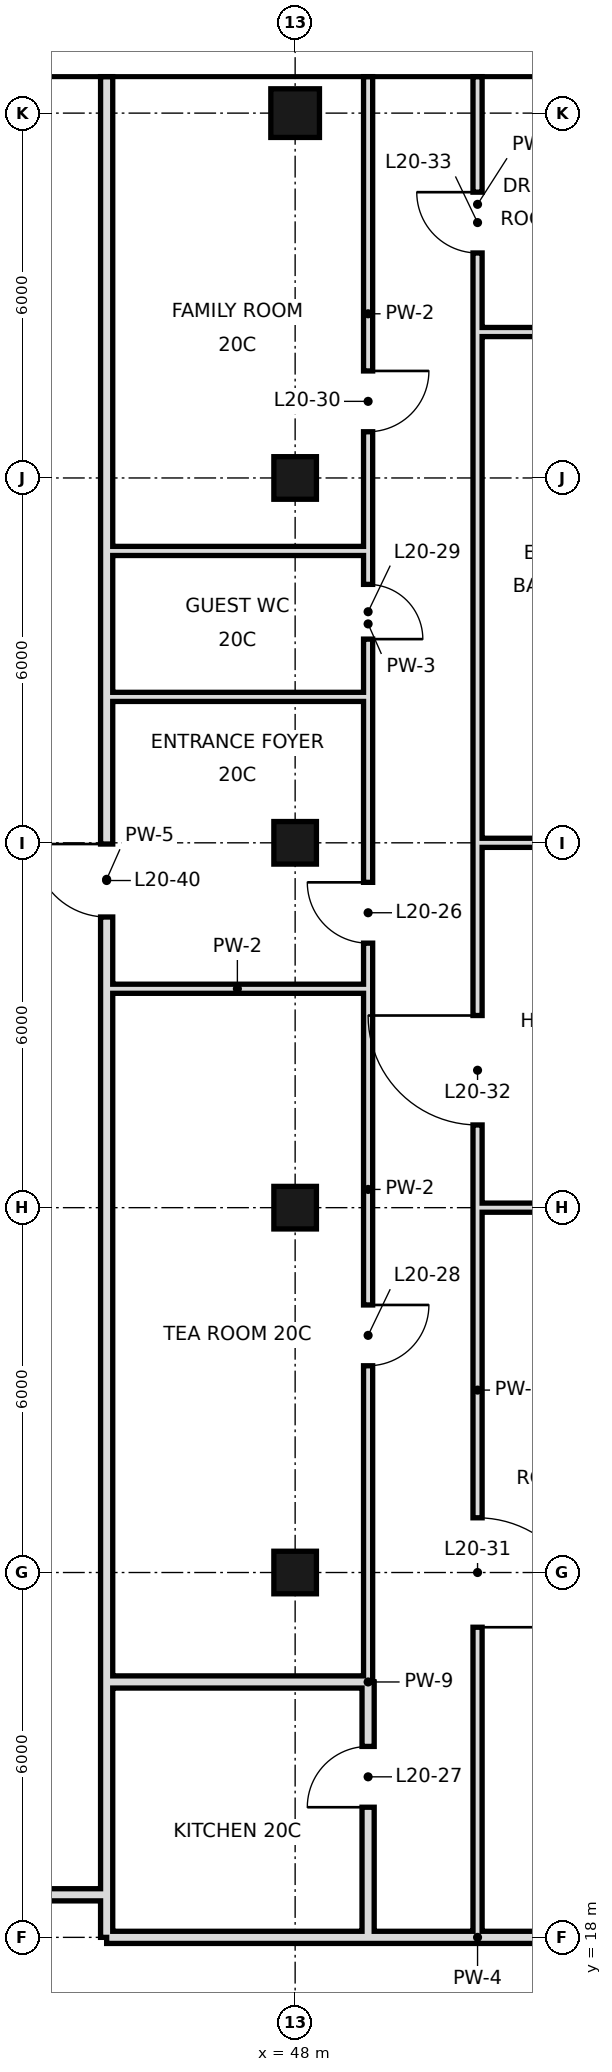
"""IFC4 building model, lengths in metres.
Left out: names, types, materials, properties, quantities, classifications, styles, units other than length and angle.
Written with IfcOpenShell. Run it as: python <this file> out.ifc"""

import sys

from ifc_helpers import new_model, si_unit, direction, frame, frame_2d, origin, origin_2d, place, context, subcontext, project, spatial, rectangle, hollow_rectangle, extrude, element, fill, save


model = new_model("IFC4")
c1 = context("Model", 3, precision=1e-05, world=origin(), true_north=direction((0.0, 1.0)))
c2 = subcontext(c1, "Body", "Model", "MODEL_VIEW")
j1 = project(units=[si_unit("LENGTHUNIT", "METRE"), si_unit("PLANEANGLEUNIT", "RADIAN")], contexts=[c1])
p1 = place(None, origin())
s1 = spatial("IfcSite", under=j1, at=p1, CompositionType="ELEMENT")
p2 = place(p1, origin())
s2 = spatial("IfcBuilding", under=s1, at=p2, CompositionType="ELEMENT")
p3 = place(p2, frame((0.0, 0.0, 96.2)))
s3 = spatial("IfcBuildingStorey", under=s2, at=p3, CompositionType="ELEMENT", Elevation=96.2)
for number, where, z_axis, x_axis in (
    (1, (48.0, 24.0, 0.0), (0.0, 0.0, 1.0), (1.0, 0.0, 0.0)),
    (2, (48.0, 30.0, 0.0), (0.0, 0.0, 1.0), (1.0, 0.0, 0.0)),
    (3, (48.0, 36.0, 0.0), (0.0, 0.0, 1.0), (1.0, 0.0, 0.0)),
    (4, (48.0, 42.0, 0.0), (0.0, 0.0, 1.0), (1.0, 0.0, 0.0)),
):
    element("IfcColumn", number, at=place(p3, frame(where, z_axis=z_axis, x_axis=x_axis)), inside=s3, PredefinedType="COLUMN", context=c2, shape_type="SweptSolid", body=[
        extrude(hollow_rectangle(XDim=0.7, YDim=0.7, WallThickness=0.036, at=origin_2d()), origin(), (0.0, 0.0, 1.0), 3.6),
    ])
p4 = place(p3, frame((48.0, 48.0, 0.0), z_axis=(0.0, 0.0, 1.0), x_axis=(1.0, 0.0, 0.0)))
e5 = element("IfcColumn", 5, at=p4, inside=s3, PredefinedType="COLUMN", context=c2, shape_type="SweptSolid", body=[
    extrude(hollow_rectangle(XDim=0.8, YDim=0.8, WallThickness=0.04, at=origin_2d()), origin(), (0.0, 0.0, 1.0), 3.6),
])
p5 = place(p3, frame((44.9, 22.2, 0.0), z_axis=(0.0, 0.0, 1.0), x_axis=(0.0, 1.0, 0.0)))
e6 = element("IfcWall", 6, at=p5, inside=s3, PredefinedType="SOLIDWALL", context=c2, shape_type="SweptSolid", body=[
    extrude(rectangle(XDim=26.4, YDim=0.2, at=frame_2d((13.2, 0.0))), origin(), (0.0, 0.0, 1.0), 2.72),
])
p6 = place(p5, frame((12.58, 0.0, 0.0)))
e7 = element("IfcOpeningElement", 7, at=p6, cuts=e6, PredefinedType="OPENING", context=c2, shape_type="SweptSolid", body=[
    extrude(rectangle(XDim=1.2, YDim=2.4, at=frame_2d((0.6, 1.2))), frame((0.0, 0.11, 0.0), z_axis=(0.0, -1.0, 0.0), x_axis=(1.0, 0.0, 0.0)), (0.0, 0.0, 1.0), 0.22),
])
p7 = place(p3, frame((44.9, 18.0, 0.0), z_axis=(0.0, 0.0, 1.0), x_axis=(0.0, 1.0, 0.0)))
e8 = element("IfcWall", 8, at=p7, inside=s3, PredefinedType="SOLIDWALL", context=c2, shape_type="SweptSolid", body=[
    extrude(rectangle(XDim=4.2, YDim=0.2, at=frame_2d((2.1, 0.0))), origin(), (0.0, 0.0, 1.0), 2.97),
])
p8 = place(p3, frame((49.2, 18.0, 0.0), z_axis=(0.0, 0.0, 1.0), x_axis=(0.0, 1.0, 0.0)))
e9 = element("IfcWall", 9, at=p8, inside=s3, PredefinedType="SOLIDWALL", context=c2, shape_type="SweptSolid", body=[
    extrude(rectangle(XDim=4.2, YDim=0.2, at=frame_2d((2.1, 0.0))), origin(), (0.0, 0.0, 1.0), 2.72),
])
p9 = place(p8, frame((2.14, 0.0, 0.0)))
e10 = element("IfcOpeningElement", 10, at=p9, cuts=e9, PredefinedType="OPENING", context=c2, shape_type="SweptSolid", body=[
    extrude(rectangle(XDim=1.0, YDim=2.4, at=frame_2d((0.5, 1.2))), frame((0.0, 0.11, 0.0), z_axis=(0.0, -1.0, 0.0), x_axis=(1.0, 0.0, 0.0)), (0.0, 0.0, 1.0), 0.22),
])
p10 = place(p3, frame((49.2, 22.2, 0.0), z_axis=(0.0, 0.0, 1.0), x_axis=(0.0, 1.0, 0.0)))
e11 = element("IfcWall", 11, at=p10, inside=s3, PredefinedType="PARTITIONING", context=c2, shape_type="SweptSolid", body=[
    extrude(rectangle(XDim=16.2, YDim=0.15, at=frame_2d((8.1, 0.0))), origin(), (0.0, 0.0, 1.0), 3.42),
])
p11 = place(p10, frame((12.15, 0.0, 0.0)))
e12 = element("IfcOpeningElement", 12, at=p11, cuts=e11, PredefinedType="OPENING", context=c2, shape_type="SweptSolid", body=[
    extrude(rectangle(XDim=1.0, YDim=2.4, at=frame_2d((0.5, 1.2))), frame((0.0, 0.085, 0.0), z_axis=(0.0, -1.0, 0.0), x_axis=(1.0, 0.0, 0.0)), (0.0, 0.0, 1.0), 0.17),
])
p12 = place(p10, frame((5.2, 0.0, 0.0)))
e13 = element("IfcOpeningElement", 13, at=p12, cuts=e11, PredefinedType="OPENING", context=c2, shape_type="SweptSolid", body=[
    extrude(rectangle(XDim=1.0, YDim=2.4, at=frame_2d((0.5, 1.2))), frame((0.0, 0.085, 0.0), z_axis=(0.0, -1.0, 0.0), x_axis=(1.0, 0.0, 0.0)), (0.0, 0.0, 1.0), 0.17),
])
p13 = place(p3, frame((49.2, 40.8, 0.0), z_axis=(0.0, 0.0, 1.0), x_axis=(0.0, 1.0, 0.0)))
e14 = element("IfcWall", 14, at=p13, inside=s3, PredefinedType="PARTITIONING", context=c2, shape_type="SweptSolid", body=[
    extrude(rectangle(XDim=7.8, YDim=0.15, at=frame_2d((3.9, 0.0))), origin(), (0.0, 0.0, 1.0), 3.42),
])
p14 = place(p13, frame((1.96, 0.0, 0.0)))
e15 = element("IfcOpeningElement", 15, at=p14, cuts=e14, PredefinedType="OPENING", context=c2, shape_type="SweptSolid", body=[
    extrude(rectangle(XDim=1.0, YDim=2.4, at=frame_2d((0.5, 1.2))), frame((0.0, 0.085, 0.0), z_axis=(0.0, -1.0, 0.0), x_axis=(1.0, 0.0, 0.0)), (0.0, 0.0, 1.0), 0.17),
])
p15 = place(p3, frame((49.2, 38.4, 0.0), z_axis=(0.0, 0.0, 1.0), x_axis=(0.0, 1.0, 0.0)))
e16 = element("IfcWall", 16, at=p15, inside=s3, PredefinedType="PARTITIONING", context=c2, shape_type="SweptSolid", body=[
    extrude(rectangle(XDim=2.4, YDim=0.15, at=frame_2d((1.2, 0.0))), origin(), (0.0, 0.0, 1.0), 3.42),
])
p16 = place(p15, frame((0.95, 0.0, 0.0)))
e17 = element("IfcOpeningElement", 17, at=p16, cuts=e16, PredefinedType="OPENING", context=c2, shape_type="SweptSolid", body=[
    extrude(rectangle(XDim=0.9, YDim=2.4, at=frame_2d((0.45, 1.2))), frame((0.0, 0.085, 0.0), z_axis=(0.0, -1.0, 0.0), x_axis=(1.0, 0.0, 0.0)), (0.0, 0.0, 1.0), 0.17),
])
p17 = place(p3, frame((51.0, 18.0, 0.0), z_axis=(0.0, 0.0, 1.0), x_axis=(0.0, 1.0, 0.0)))
e18 = element("IfcWall", 18, at=p17, inside=s3, PredefinedType="PARTITIONING", context=c2, shape_type="SweptSolid", body=[
    extrude(rectangle(XDim=18.0, YDim=0.15, at=frame_2d((9.0, 0.0))), origin(), (0.0, 0.0, 1.0), 3.42),
])
p18 = place(p17, frame((5.1, 0.0, 0.0)))
e19 = element("IfcOpeningElement", 19, at=p18, cuts=e18, PredefinedType="OPENING", context=c2, shape_type="SweptSolid", body=[
    extrude(rectangle(XDim=1.8, YDim=2.4, at=frame_2d((0.9, 1.2))), frame((0.0, 0.085, 0.0), z_axis=(0.0, -1.0, 0.0), x_axis=(1.0, 0.0, 0.0)), (0.0, 0.0, 1.0), 0.17),
])
p19 = place(p17, frame((13.36, 0.0, 0.0)))
e20 = element("IfcOpeningElement", 20, at=p19, cuts=e18, PredefinedType="OPENING", context=c2, shape_type="SweptSolid", body=[
    extrude(rectangle(XDim=1.8, YDim=2.4, at=frame_2d((0.9, 1.2))), frame((0.0, 0.085, 0.0), z_axis=(0.0, -1.0, 0.0), x_axis=(1.0, 0.0, 0.0)), (0.0, 0.0, 1.0), 0.17),
])
p20 = place(p3, frame((51.0, 44.4, 0.0), z_axis=(0.0, 0.0, 1.0), x_axis=(0.0, 1.0, 0.0)))
e21 = element("IfcWall", 21, at=p20, inside=s3, PredefinedType="PARTITIONING", context=c2, shape_type="SweptSolid", body=[
    extrude(rectangle(XDim=4.2, YDim=0.15, at=frame_2d((2.1, 0.0))), origin(), (0.0, 0.0, 1.0), 3.42),
])
p21 = place(p20, frame((1.3, 0.0, 0.0)))
e22 = element("IfcOpeningElement", 22, at=p21, cuts=e21, PredefinedType="OPENING", context=c2, shape_type="SweptSolid", body=[
    extrude(rectangle(XDim=1.0, YDim=2.4, at=frame_2d((0.5, 1.2))), frame((0.0, 0.085, 0.0), z_axis=(0.0, -1.0, 0.0), x_axis=(1.0, 0.0, 0.0)), (0.0, 0.0, 1.0), 0.17),
])
p22 = place(p3, frame((51.0, 36.0, 0.0), z_axis=(0.0, 0.0, 1.0), x_axis=(0.0, 1.0, 0.0)))
e23 = element("IfcWall", 23, at=p22, inside=s3, PredefinedType="PARTITIONING", context=c2, shape_type="SweptSolid", body=[
    extrude(rectangle(XDim=8.4, YDim=0.15, at=frame_2d((4.2, 0.0))), origin(), (0.0, 0.0, 1.0), 3.42),
])
p23 = place(p3, frame((44.9, 18.0, 0.0), z_axis=(0.0, 0.0, 1.0), x_axis=(1.0, 0.0, 0.0)))
e24 = element("IfcWall", 24, at=p23, inside=s3, PredefinedType="SOLIDWALL", context=c2, shape_type="SweptSolid", body=[
    extrude(rectangle(XDim=4.3, YDim=0.2, at=frame_2d((2.15, 0.0))), origin(), (0.0, 0.0, 1.0), 2.72),
])
p24 = place(p3, frame((49.2, 18.0, 0.0), z_axis=(0.0, 0.0, 1.0), x_axis=(1.0, 0.0, 0.0)))
e25 = element("IfcWall", 25, at=p24, inside=s3, PredefinedType="SOLIDWALL", context=c2, shape_type="SweptSolid", body=[
    extrude(rectangle(XDim=3.6, YDim=0.2, at=frame_2d((1.8, 0.0))), origin(), (0.0, 0.0, 1.0), 2.72),
])
p25 = place(p3, frame((12.6, 18.7, 0.0), z_axis=(0.0, 0.0, 1.0), x_axis=(1.0, 0.0, 0.0)))
e26 = element("IfcWall", 26, at=p25, inside=s3, PredefinedType="SOLIDWALL", context=c2, shape_type="SweptSolid", body=[
    extrude(rectangle(XDim=32.3, YDim=0.2, at=frame_2d((16.15, 0.0))), origin(), (0.0, 0.0, 1.0), 2.72),
])
p26 = place(p25, frame((7.78, 0.0, 0.0)))
e27 = element("IfcOpeningElement", 27, at=p26, cuts=e26, PredefinedType="OPENING", context=c2, shape_type="SweptSolid", body=[
    extrude(rectangle(XDim=1.2, YDim=2.4, at=frame_2d((0.6, 1.2))), frame((0.0, 0.11, 0.0), z_axis=(0.0, -1.0, 0.0), x_axis=(1.0, 0.0, 0.0)), (0.0, 0.0, 1.0), 0.22),
])
p27 = place(p25, frame((24.6, 0.0, 0.0)))
e28 = element("IfcOpeningElement", 28, at=p27, cuts=e26, PredefinedType="OPENING", context=c2, shape_type="SweptSolid", body=[
    extrude(rectangle(XDim=1.2, YDim=2.4, at=frame_2d((0.6, 1.2))), frame((0.0, 0.11, 0.0), z_axis=(0.0, -1.0, 0.0), x_axis=(1.0, 0.0, 0.0)), (0.0, 0.0, 1.0), 0.22),
])
p28 = place(p3, frame((44.9, 22.2, 0.0), z_axis=(0.0, 0.0, 1.0), x_axis=(1.0, 0.0, 0.0)))
e29 = element("IfcWall", 29, at=p28, inside=s3, PredefinedType="SOLIDWALL", context=c2, shape_type="SweptSolid", body=[
    extrude(rectangle(XDim=4.3, YDim=0.2, at=frame_2d((2.15, 0.0))), origin(), (0.0, 0.0, 1.0), 2.72),
])
p29 = place(p3, frame((51.0, 30.0, 0.0), z_axis=(0.0, 0.0, 1.0), x_axis=(1.0, 0.0, 0.0)))
e30 = element("IfcWall", 30, at=p29, inside=s3, PredefinedType="PARTITIONING", context=c2, shape_type="SweptSolid", body=[
    extrude(rectangle(XDim=9.6, YDim=0.15, at=frame_2d((4.8, 0.0))), origin(), (0.0, 0.0, 1.0), 2.72),
])
p30 = place(p3, frame((44.9, 33.6, 0.0), z_axis=(0.0, 0.0, 1.0), x_axis=(1.0, 0.0, 0.0)))
e31 = element("IfcWall", 31, at=p30, inside=s3, PredefinedType="PARTITIONING", context=c2, shape_type="SweptSolid", body=[
    extrude(rectangle(XDim=4.3, YDim=0.15, at=frame_2d((2.15, 0.0))), origin(), (0.0, 0.0, 1.0), 3.42),
])
p31 = place(p3, frame((51.0, 36.0, 0.0), z_axis=(0.0, 0.0, 1.0), x_axis=(1.0, 0.0, 0.0)))
e32 = element("IfcWall", 32, at=p31, inside=s3, PredefinedType="PARTITIONING", context=c2, shape_type="SweptSolid", body=[
    extrude(rectangle(XDim=3.0, YDim=0.15, at=frame_2d((1.5, 0.0))), origin(), (0.0, 0.0, 1.0), 2.72),
])
for number, where, z_axis, x_axis in (
    (33, (44.9, 38.4, 0.0), (0.0, 0.0, 1.0), (1.0, 0.0, 0.0)),
    (34, (44.9, 40.8, 0.0), (0.0, 0.0, 1.0), (1.0, 0.0, 0.0)),
):
    element("IfcWall", number, at=place(p3, frame(where, z_axis=z_axis, x_axis=x_axis)), inside=s3, PredefinedType="PARTITIONING", context=c2, shape_type="SweptSolid", body=[
        extrude(rectangle(XDim=4.3, YDim=0.15, at=frame_2d((2.15, 0.0))), origin(), (0.0, 0.0, 1.0), 3.42),
    ])
p32 = place(p3, frame((51.0, 44.4, 0.0), z_axis=(0.0, 0.0, 1.0), x_axis=(1.0, 0.0, 0.0)))
e35 = element("IfcWall", 35, at=p32, inside=s3, PredefinedType="PARTITIONING", context=c2, shape_type="SweptSolid", body=[
    extrude(rectangle(XDim=3.0, YDim=0.15, at=frame_2d((1.5, 0.0))), origin(), (0.0, 0.0, 1.0), 3.42),
])
p33 = place(p11, frame((1.0, 0.0, 0.0), z_axis=(0.0, 0.0, 1.0), x_axis=(-1.0, 0.0, 0.0)))
e36 = element("IfcDoor", 36, at=p33, inside=s3, OperationType="SINGLE_SWING_LEFT", PredefinedType="DOOR", context=c2, shape_type="SweptSolid", body=[
    extrude(rectangle(XDim=1.0, YDim=2.4, at=frame_2d((0.5, 1.2))), frame((0.0, 0.025, 0.0), z_axis=(0.0, -1.0, 0.0), x_axis=(1.0, 0.0, 0.0)), (0.0, 0.0, 1.0), 0.05),
])
fill(e12, e36)
p34 = place(p9, origin())
e37 = element("IfcDoor", 37, at=p34, inside=s3, OperationType="SINGLE_SWING_LEFT", PredefinedType="DOOR", context=c2, shape_type="SweptSolid", body=[
    extrude(rectangle(XDim=1.0, YDim=2.4, at=frame_2d((0.5, 1.2))), frame((0.0, 0.025, 0.0), z_axis=(0.0, -1.0, 0.0), x_axis=(1.0, 0.0, 0.0)), (0.0, 0.0, 1.0), 0.05),
])
fill(e10, e37)
p35 = place(p12, origin())
e38 = element("IfcDoor", 38, at=p35, inside=s3, OperationType="SINGLE_SWING_RIGHT", PredefinedType="DOOR", context=c2, shape_type="SweptSolid", body=[
    extrude(rectangle(XDim=1.0, YDim=2.4, at=frame_2d((0.5, 1.2))), frame((0.0, 0.025, 0.0), z_axis=(0.0, -1.0, 0.0), x_axis=(1.0, 0.0, 0.0)), (0.0, 0.0, 1.0), 0.05),
])
fill(e13, e38)
p36 = place(p16, frame((0.9, 0.0, 0.0), z_axis=(0.0, 0.0, 1.0), x_axis=(-1.0, 0.0, 0.0)))
e39 = element("IfcDoor", 39, at=p36, inside=s3, OperationType="SINGLE_SWING_RIGHT", PredefinedType="DOOR", context=c2, shape_type="SweptSolid", body=[
    extrude(rectangle(XDim=0.9, YDim=2.4, at=frame_2d((0.45, 1.2))), frame((0.0, 0.025, 0.0), z_axis=(0.0, -1.0, 0.0), x_axis=(1.0, 0.0, 0.0)), (0.0, 0.0, 1.0), 0.05),
])
fill(e17, e39)
p37 = place(p14, origin())
e40 = element("IfcDoor", 40, at=p37, inside=s3, OperationType="SINGLE_SWING_RIGHT", PredefinedType="DOOR", context=c2, shape_type="SweptSolid", body=[
    extrude(rectangle(XDim=1.0, YDim=2.4, at=frame_2d((0.5, 1.2))), frame((0.0, 0.025, 0.0), z_axis=(0.0, -1.0, 0.0), x_axis=(1.0, 0.0, 0.0)), (0.0, 0.0, 1.0), 0.05),
])
fill(e15, e40)
p38 = place(p18, frame((1.8, 0.0, 0.0), z_axis=(0.0, 0.0, 1.0), x_axis=(-1.0, 0.0, 0.0)))
e41 = element("IfcDoor", 41, at=p38, inside=s3, OperationType="SINGLE_SWING_RIGHT", PredefinedType="DOOR", context=c2, shape_type="SweptSolid", body=[
    extrude(rectangle(XDim=1.8, YDim=2.4, at=frame_2d((0.9, 1.2))), frame((0.0, 0.025, 0.0), z_axis=(0.0, -1.0, 0.0), x_axis=(1.0, 0.0, 0.0)), (0.0, 0.0, 1.0), 0.05),
])
fill(e19, e41)
p39 = place(p19, frame((1.8, 0.0, 0.0), z_axis=(0.0, 0.0, 1.0), x_axis=(-1.0, 0.0, 0.0)))
e42 = element("IfcDoor", 42, at=p39, inside=s3, OperationType="SINGLE_SWING_LEFT", PredefinedType="DOOR", context=c2, shape_type="SweptSolid", body=[
    extrude(rectangle(XDim=1.8, YDim=2.4, at=frame_2d((0.9, 1.2))), frame((0.0, 0.025, 0.0), z_axis=(0.0, -1.0, 0.0), x_axis=(1.0, 0.0, 0.0)), (0.0, 0.0, 1.0), 0.05),
])
fill(e20, e42)
p40 = place(p21, frame((1.0, 0.0, 0.0), z_axis=(0.0, 0.0, 1.0), x_axis=(-1.0, 0.0, 0.0)))
e43 = element("IfcDoor", 43, at=p40, inside=s3, OperationType="SINGLE_SWING_LEFT", PredefinedType="DOOR", context=c2, shape_type="SweptSolid", body=[
    extrude(rectangle(XDim=1.0, YDim=2.4, at=frame_2d((0.5, 1.2))), frame((0.0, 0.025, 0.0), z_axis=(0.0, -1.0, 0.0), x_axis=(1.0, 0.0, 0.0)), (0.0, 0.0, 1.0), 0.05),
])
fill(e22, e43)
p41 = place(p6, frame((1.2, 0.0, 0.0), z_axis=(0.0, 0.0, 1.0), x_axis=(-1.0, 0.0, 0.0)))
e44 = element("IfcDoor", 44, at=p41, inside=s3, OperationType="SINGLE_SWING_LEFT", PredefinedType="DOOR", context=c2, shape_type="SweptSolid", body=[
    extrude(rectangle(XDim=1.2, YDim=2.4, at=frame_2d((0.6, 1.2))), frame((0.0, 0.025, 0.0), z_axis=(0.0, -1.0, 0.0), x_axis=(1.0, 0.0, 0.0)), (0.0, 0.0, 1.0), 0.05),
])
fill(e7, e44)
save(model, sys.argv[1])
